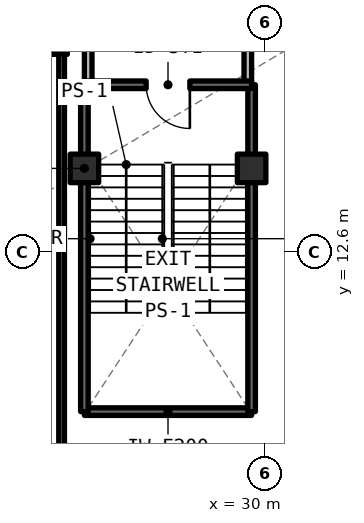
"""IFC4 building model, lengths in metres.
Left out: names, types, materials, properties, quantities, classifications, styles, units other than length and angle.
Written with IfcOpenShell. Run it as: python <this file> out.ifc"""

import sys

from ifc_helpers import new_model, si_unit, direction, frame, frame_2d, origin, origin_2d, place, context, subcontext, project, spatial, rectangle, extrude, element, fill, save


model = new_model("IFC4")
c1 = context("Model", 3, precision=1e-05, world=origin(), true_north=direction((0.0, 1.0)))
c2 = subcontext(c1, "Body", "Model", "MODEL_VIEW")
j1 = project(units=[si_unit("LENGTHUNIT", "METRE"), si_unit("PLANEANGLEUNIT", "RADIAN")], contexts=[c1])
p1 = place(None, origin())
s1 = spatial("IfcSite", under=j1, at=p1, CompositionType="ELEMENT")
p2 = place(p1, origin())
s2 = spatial("IfcBuilding", under=s1, at=p2, CompositionType="ELEMENT")
p3 = place(p2, frame((0.0, 0.0, 14.85)))
s3 = spatial("IfcBuildingStorey", under=s2, at=p3, CompositionType="ELEMENT", Elevation=14.85)
p4 = place(p3, frame((24.0, 18.6, 0.0), z_axis=(0.0, 0.0, 1.0), x_axis=(1.0, 0.0, 0.0)))
e1 = element("IfcColumn", 1, at=p4, inside=s3, PredefinedType="COLUMN", context=c2, shape_type="SweptSolid", body=[
    extrude(rectangle(XDim=1.6, YDim=1.6, at=origin_2d()), origin(), (0.0, 0.0, 1.0), 4.62),
])
for number, where, z_axis, x_axis in (
    (2, (25.25, 14.8, 0.0), (0.0, 0.0, 1.0), (1.0, 0.0, 0.0)),
    (3, (29.65, 14.8, 0.0), (0.0, 0.0, 1.0), (1.0, 0.0, 0.0)),
):
    element("IfcColumn", number, at=place(p3, frame(where, z_axis=z_axis, x_axis=x_axis)), inside=s3, PredefinedType="COLUMN", context=c2, shape_type="SweptSolid", body=[
        extrude(rectangle(XDim=0.75, YDim=0.75, at=origin_2d()), origin(), (0.0, 0.0, 1.0), 4.62),
    ])
for number, where, z_axis, x_axis in (
    (4, (25.35, 17.0, 0.0), (0.0, 0.0, 1.0), (0.0, 1.0, 0.0)),
    (5, (29.55, 17.0, 0.0), (0.0, 0.0, 1.0), (0.0, 1.0, 0.0)),
):
    element("IfcWall", number, at=place(p3, frame(where, z_axis=z_axis, x_axis=x_axis)), inside=s3, PredefinedType="SOLIDWALL", context=c2, shape_type="SweptSolid", body=[
        extrude(rectangle(XDim=4.6, YDim=0.2, at=frame_2d((2.3, 0.0))), origin(), (0.0, 0.0, 1.0), 3.56),
    ])
p5 = place(p3, frame((24.65, 3.14, 0.0), z_axis=(0.0, 0.0, 1.0), x_axis=(0.0, 1.0, 0.0)))
e6 = element("IfcWall", 6, at=p5, inside=s3, PredefinedType="SOLIDWALL", context=c2, shape_type="SweptSolid", body=[
    extrude(rectangle(XDim=18.41, YDim=0.15, at=frame_2d((9.205, 0.0))), origin(), (0.0, 0.0, 1.0), 3.56),
])
p6 = place(p3, frame((25.25, 8.4, 0.0), z_axis=(0.0, 0.0, 1.0), x_axis=(1.0, 0.0, 0.0)))
e7 = element("IfcWall", 7, at=p6, inside=s3, PredefinedType="SOLIDWALL", context=c2, shape_type="SweptSolid", body=[
    extrude(rectangle(XDim=4.4, YDim=0.2, at=frame_2d((2.2, 0.0))), origin(), (0.0, 0.0, 1.0), 4.62),
])
p7 = place(p3, frame((29.65, 8.4, 0.0), z_axis=(0.0, 0.0, 1.0), x_axis=(0.0, 1.0, 0.0)))
e8 = element("IfcWall", 8, at=p7, inside=s3, PredefinedType="SOLIDWALL", context=c2, shape_type="SweptSolid", body=[
    extrude(rectangle(XDim=8.6, YDim=0.2, at=frame_2d((4.3, 0.0))), origin(), (0.0, 0.0, 1.0), 4.62),
])
p8 = place(p3, frame((29.65, 17.0, 0.0), z_axis=(0.0, 0.0, 1.0), x_axis=(-1.0, 0.0, 0.0)))
e9 = element("IfcWall", 9, at=p8, inside=s3, PredefinedType="SOLIDWALL", context=c2, shape_type="SweptSolid", body=[
    extrude(rectangle(XDim=4.4, YDim=0.2, at=frame_2d((2.2, 0.0))), origin(), (0.0, 0.0, 1.0), 4.62),
])
p9 = place(p8, frame((1.625, 0.0, 0.0)))
e10 = element("IfcOpeningElement", 10, at=p9, cuts=e9, PredefinedType="OPENING", context=c2, shape_type="SweptSolid", body=[
    extrude(rectangle(XDim=1.15, YDim=2.15, at=frame_2d((0.575, 1.075))), frame((0.0, 0.11, 0.0), z_axis=(0.0, -1.0, 0.0), x_axis=(1.0, 0.0, 0.0)), (0.0, 0.0, 1.0), 0.22),
])
p10 = place(p3, frame((25.25, 17.0, 0.0), z_axis=(0.0, 0.0, 1.0), x_axis=(0.0, -1.0, 0.0)))
e11 = element("IfcWall", 11, at=p10, inside=s3, PredefinedType="SOLIDWALL", context=c2, shape_type="SweptSolid", body=[
    extrude(rectangle(XDim=8.6, YDim=0.2, at=frame_2d((4.3, 0.0))), origin(), (0.0, 0.0, 1.0), 4.62),
])
p11 = place(p9, origin())
e12 = element("IfcDoor", 12, at=p11, inside=s3, OperationType="SINGLE_SWING_RIGHT", PredefinedType="DOOR", context=c2, shape_type="SweptSolid", body=[
    extrude(rectangle(XDim=1.15, YDim=2.15, at=frame_2d((0.575, 1.075))), frame((0.0, 0.025, 0.0), z_axis=(0.0, -1.0, 0.0), x_axis=(1.0, 0.0, 0.0)), (0.0, 0.0, 1.0), 0.05),
])
fill(e10, e12)
save(model, sys.argv[1])
